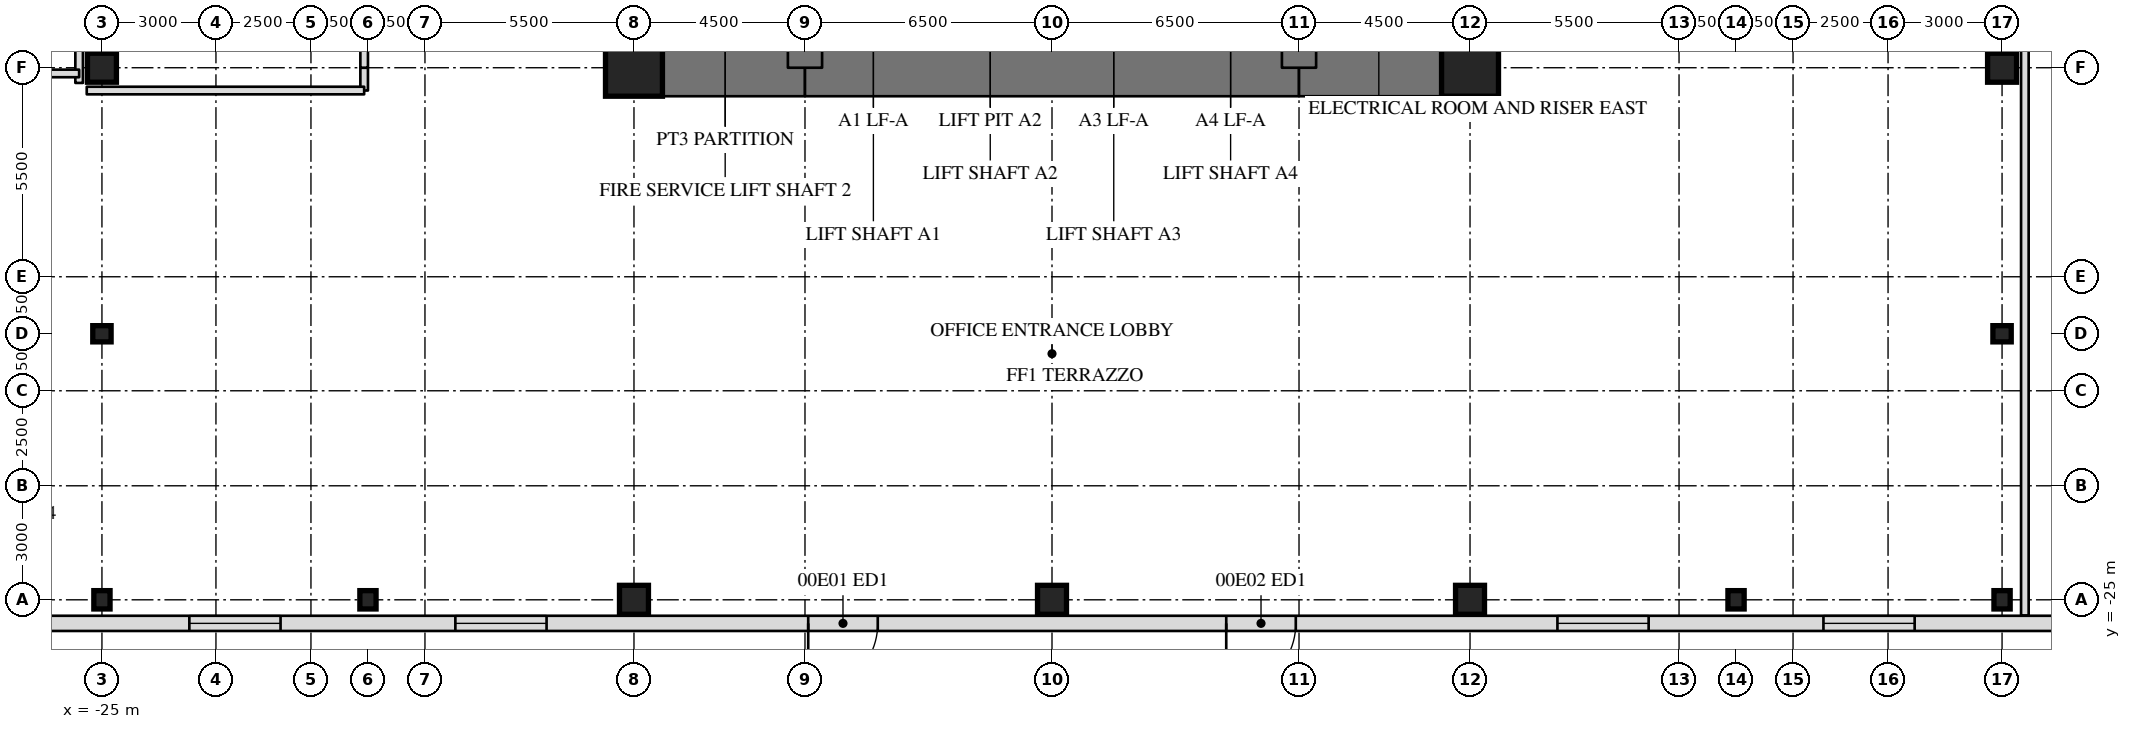
"""IFC4 building model, lengths in metres.
Left out: names, types, materials, properties, quantities, classifications, styles, units other than length and angle.
Written with IfcOpenShell. Run it as: python <this file> out.ifc"""

import sys

from ifc_helpers import new_model, si_unit, direction, frame, frame_2d, origin, origin_2d, place, context, subcontext, project, spatial, rectangle, hollow_rectangle, i_section, extrude, element, fill, save


model = new_model("IFC4")
c1 = context("Model", 3, precision=1e-05, world=origin(), true_north=direction((0.0, 1.0)))
c2 = subcontext(c1, "Body", "Model", "MODEL_VIEW")
j1 = project(units=[si_unit("LENGTHUNIT", "METRE"), si_unit("PLANEANGLEUNIT", "RADIAN")], contexts=[c1])
p1 = place(None, origin())
s1 = spatial("IfcSite", under=j1, at=p1, CompositionType="ELEMENT")
p2 = place(p1, origin())
s2 = spatial("IfcBuilding", under=s1, at=p2, CompositionType="ELEMENT")
p3 = place(p2, origin())
s3 = spatial("IfcBuildingStorey", under=s2, at=p3, CompositionType="ELEMENT", Elevation=0.0)
p4 = place(p3, frame((-25.0, -11.0, -0.3), z_axis=(0.0, 0.0, 1.0), x_axis=(0.0, 1.0, 0.0)))
e1 = element("IfcColumn", 1, at=p4, inside=s3, PredefinedType="COLUMN", context=c2, shape_type="SweptSolid", body=[
    extrude(hollow_rectangle(XDim=0.762, YDim=0.762, WallThickness=0.152, at=origin_2d()), origin(), (0.0, 0.0, 1.0), 6.3),
])
for number, where, z_axis, x_axis in (
    (2, (-25.0, -18.0, -0.3), (0.0, 0.0, 1.0), (0.0, 1.0, 0.0)),
    (3, (-25.0, -25.0, -0.3), (0.0, 0.0, 1.0), (1.0, 0.0, 0.0)),
    (4, (-18.0, -25.0, -0.3), (0.0, 0.0, 1.0), (1.0, 0.0, 0.0)),
):
    element("IfcColumn", number, at=place(p3, frame(where, z_axis=z_axis, x_axis=x_axis)), inside=s3, PredefinedType="COLUMN", context=c2, shape_type="SweptSolid", body=[
        extrude(i_section(OverallWidth=0.427, OverallDepth=0.483, WebThickness=0.051, FlangeThickness=0.082, at=origin_2d()), origin(), (0.0, 0.0, 1.0), 6.3),
    ])
for number, where, z_axis, x_axis in (
    (5, (-11.0, -25.0, -0.3), (0.0, 0.0, 1.0), (1.0, 0.0, 0.0)),
    (6, (0.0, -25.0, -0.3), (0.0, 0.0, 1.0), (1.0, 0.0, 0.0)),
    (7, (11.0, -25.0, -0.3), (0.0, 0.0, 1.0), (1.0, 0.0, 0.0)),
):
    element("IfcColumn", number, at=place(p3, frame(where, z_axis=z_axis, x_axis=x_axis)), inside=s3, PredefinedType="COLUMN", context=c2, shape_type="SweptSolid", body=[
        extrude(hollow_rectangle(XDim=0.762, YDim=0.762, WallThickness=0.152, at=origin_2d()), origin(), (0.0, 0.0, 1.0), 6.3),
    ])
for number, where, z_axis, x_axis in (
    (8, (18.0, -25.0, -0.3), (0.0, 0.0, 1.0), (1.0, 0.0, 0.0)),
    (9, (25.0, -25.0, -0.3), (0.0, 0.0, 1.0), (1.0, 0.0, 0.0)),
    (10, (25.0, -18.0, -0.3), (0.0, 0.0, 1.0), (0.0, 1.0, 0.0)),
):
    element("IfcColumn", number, at=place(p3, frame(where, z_axis=z_axis, x_axis=x_axis)), inside=s3, PredefinedType="COLUMN", context=c2, shape_type="SweptSolid", body=[
        extrude(i_section(OverallWidth=0.427, OverallDepth=0.483, WebThickness=0.051, FlangeThickness=0.082, at=origin_2d()), origin(), (0.0, 0.0, 1.0), 6.3),
    ])
p5 = place(p3, frame((25.0, -11.0, -0.3), z_axis=(0.0, 0.0, 1.0), x_axis=(0.0, 1.0, 0.0)))
e11 = element("IfcColumn", 11, at=p5, inside=s3, PredefinedType="COLUMN", context=c2, shape_type="SweptSolid", body=[
    extrude(hollow_rectangle(XDim=0.762, YDim=0.762, WallThickness=0.152, at=origin_2d()), origin(), (0.0, 0.0, 1.0), 6.3),
])
p6 = place(p3, frame((11.0, -11.0, -0.3), z_axis=(0.0, 0.0, 1.0), x_axis=(0.0, 1.0, 0.0)))
e12 = element("IfcWall", 12, at=p6, inside=s3, PredefinedType="SHEAR", context=c2, shape_type="SweptSolid", body=[
    extrude(rectangle(XDim=22.0, YDim=1.5, at=frame_2d((11.0, 0.0))), origin(), (0.0, 0.0, 1.0), 6.3),
])
p7 = place(p6, frame((15.393, 0.0, 0.3)))
e13 = element("IfcOpeningElement", 13, at=p7, cuts=e12, PredefinedType="OPENING", context=c2, shape_type="SweptSolid", body=[
    extrude(rectangle(XDim=0.915, YDim=2.134, at=frame_2d((0.458, 1.067))), frame((0.0, 0.76, 0.0), z_axis=(0.0, -1.0, 0.0), x_axis=(1.0, 0.0, 0.0)), (0.0, 0.0, 1.0), 1.52),
])
p8 = place(p3, frame((-11.0, 11.0, -0.3), z_axis=(0.0, 0.0, 1.0), x_axis=(0.0, -1.0, 0.0)))
e14 = element("IfcWall", 14, at=p8, inside=s3, PredefinedType="SHEAR", context=c2, shape_type="SweptSolid", body=[
    extrude(rectangle(XDim=22.0, YDim=1.5, at=frame_2d((11.0, 0.0))), origin(), (0.0, 0.0, 1.0), 6.3),
])
p9 = place(p8, frame((15.393, 0.0, 0.3)))
e15 = element("IfcOpeningElement", 15, at=p9, cuts=e14, PredefinedType="OPENING", context=c2, shape_type="SweptSolid", body=[
    extrude(rectangle(XDim=0.915, YDim=2.134, at=frame_2d((0.458, 1.067))), frame((0.0, 0.76, 0.0), z_axis=(0.0, -1.0, 0.0), x_axis=(1.0, 0.0, 0.0)), (0.0, 0.0, 1.0), 1.52),
])
p10 = place(p3, frame((-11.0, -11.0, -0.3), z_axis=(0.0, 0.0, 1.0), x_axis=(1.0, 0.0, 0.0)))
e16 = element("IfcWall", 16, at=p10, inside=s3, PredefinedType="SHEAR", context=c2, shape_type="SweptSolid", body=[
    extrude(rectangle(XDim=4.5, YDim=1.5, at=frame_2d((2.25, 0.0))), origin(), (0.0, 0.0, 1.0), 6.3),
])
p11 = place(p3, frame((-6.5, -11.0, -0.3), z_axis=(0.0, 0.0, 1.0), x_axis=(1.0, 0.0, 0.0)))
e17 = element("IfcWall", 17, at=p11, inside=s3, PredefinedType="SHEAR", context=c2, shape_type="SweptSolid", body=[
    extrude(rectangle(XDim=13.0, YDim=1.5, at=frame_2d((6.5, 0.0))), origin(), (0.0, 0.0, 1.0), 6.3),
])
p12 = place(p3, frame((6.5, -11.0, -0.3), z_axis=(0.0, 0.0, 1.0), x_axis=(1.0, 0.0, 0.0)))
e18 = element("IfcWall", 18, at=p12, inside=s3, PredefinedType="SHEAR", context=c2, shape_type="SweptSolid", body=[
    extrude(rectangle(XDim=4.5, YDim=1.5, at=frame_2d((2.25, 0.0))), origin(), (0.0, 0.0, 1.0), 6.3),
])
for number, where, z_axis, x_axis in (
    (19, (6.5, -11.0, -0.3), (0.0, 0.0, 1.0), (0.0, 1.0, 0.0)),
    (20, (-6.5, -6.5, -0.3), (0.0, 0.0, 1.0), (0.0, -1.0, 0.0)),
):
    element("IfcWall", number, at=place(p3, frame(where, z_axis=z_axis, x_axis=x_axis)), inside=s3, PredefinedType="SHEAR", context=c2, shape_type="SweptSolid", body=[
        extrude(rectangle(XDim=4.5, YDim=0.9, at=frame_2d((2.25, 0.0))), origin(), (0.0, 0.0, 1.0), 6.3),
    ])
for number, where, z_axis, x_axis in (
    (21, (-11.0, -11.0, -0.3), (0.0, 0.0, 1.0), (1.0, 0.0, 0.0)),
    (22, (11.0, -11.0, -0.3), (0.0, 0.0, 1.0), (1.0, 0.0, 0.0)),
):
    element("IfcColumn", number, at=place(p3, frame(where, z_axis=z_axis, x_axis=x_axis)), inside=s3, PredefinedType="COLUMN", context=c2, shape_type="SweptSolid", body=[
        extrude(hollow_rectangle(XDim=1.499, YDim=1.499, WallThickness=0.102, at=origin_2d()), origin(), (0.0, 0.0, 1.0), 6.3),
    ])
p13 = place(p3, frame((-39.82, -25.62, -0.3), z_axis=(0.0, 0.0, 1.0), x_axis=(1.0, 0.0, 0.0)))
e23 = element("IfcWall", 23, at=p13, inside=s3, PredefinedType="SOLIDWALL", context=c2, shape_type="SweptSolid", body=[
    extrude(rectangle(XDim=79.64, YDim=0.4, at=frame_2d((39.82, 0.0))), origin(), (0.0, 0.0, 1.0), 6.11),
])
p14 = place(p13, frame((3.12, 0.0, 1.2)))
e24 = element("IfcOpeningElement", 24, at=p14, cuts=e23, PredefinedType="OPENING", context=c2, shape_type="SweptSolid", body=[
    extrude(rectangle(XDim=2.4, YDim=4.2, at=frame_2d((1.2, 2.1))), frame((0.0, 0.21, 0.0), z_axis=(0.0, -1.0, 0.0), x_axis=(1.0, 0.0, 0.0)), (0.0, 0.0, 1.0), 0.42),
])
p15 = place(p13, frame((17.12, 0.0, 1.2)))
e25 = element("IfcOpeningElement", 25, at=p15, cuts=e23, PredefinedType="OPENING", context=c2, shape_type="SweptSolid", body=[
    extrude(rectangle(XDim=2.4, YDim=4.2, at=frame_2d((1.2, 2.1))), frame((0.0, 0.21, 0.0), z_axis=(0.0, -1.0, 0.0), x_axis=(1.0, 0.0, 0.0)), (0.0, 0.0, 1.0), 0.42),
])
p16 = place(p13, frame((24.12, 0.0, 1.2)))
e26 = element("IfcOpeningElement", 26, at=p16, cuts=e23, PredefinedType="OPENING", context=c2, shape_type="SweptSolid", body=[
    extrude(rectangle(XDim=2.4, YDim=4.2, at=frame_2d((1.2, 2.1))), frame((0.0, 0.21, 0.0), z_axis=(0.0, -1.0, 0.0), x_axis=(1.0, 0.0, 0.0)), (0.0, 0.0, 1.0), 0.42),
])
p17 = place(p13, frame((33.405, 0.0, 0.3)))
e27 = element("IfcOpeningElement", 27, at=p17, cuts=e23, PredefinedType="OPENING", context=c2, shape_type="SweptSolid", body=[
    extrude(rectangle(XDim=1.83, YDim=2.44, at=frame_2d((0.915, 1.22))), frame((0.0, 0.21, 0.0), z_axis=(0.0, -1.0, 0.0), x_axis=(1.0, 0.0, 0.0)), (0.0, 0.0, 1.0), 0.42),
])
p18 = place(p13, frame((44.405, 0.0, 0.3)))
e28 = element("IfcOpeningElement", 28, at=p18, cuts=e23, PredefinedType="OPENING", context=c2, shape_type="SweptSolid", body=[
    extrude(rectangle(XDim=1.83, YDim=2.44, at=frame_2d((0.915, 1.22))), frame((0.0, 0.21, 0.0), z_axis=(0.0, -1.0, 0.0), x_axis=(1.0, 0.0, 0.0)), (0.0, 0.0, 1.0), 0.42),
])
p19 = place(p13, frame((53.12, 0.0, 1.2)))
e29 = element("IfcOpeningElement", 29, at=p19, cuts=e23, PredefinedType="OPENING", context=c2, shape_type="SweptSolid", body=[
    extrude(rectangle(XDim=2.4, YDim=4.2, at=frame_2d((1.2, 2.1))), frame((0.0, 0.21, 0.0), z_axis=(0.0, -1.0, 0.0), x_axis=(1.0, 0.0, 0.0)), (0.0, 0.0, 1.0), 0.42),
])
p20 = place(p13, frame((60.12, 0.0, 1.2)))
e30 = element("IfcOpeningElement", 30, at=p20, cuts=e23, PredefinedType="OPENING", context=c2, shape_type="SweptSolid", body=[
    extrude(rectangle(XDim=2.4, YDim=4.2, at=frame_2d((1.2, 2.1))), frame((0.0, 0.21, 0.0), z_axis=(0.0, -1.0, 0.0), x_axis=(1.0, 0.0, 0.0)), (0.0, 0.0, 1.0), 0.42),
])
p21 = place(p13, frame((67.785, 0.0, 0.3)))
e31 = element("IfcOpeningElement", 31, at=p21, cuts=e23, PredefinedType="OPENING", context=c2, shape_type="SweptSolid", body=[
    extrude(rectangle(XDim=1.07, YDim=2.44, at=frame_2d((0.535, 1.22))), frame((0.0, 0.21, 0.0), z_axis=(0.0, -1.0, 0.0), x_axis=(1.0, 0.0, 0.0)), (0.0, 0.0, 1.0), 0.42),
])
p22 = place(p13, frame((74.12, 0.0, 1.2)))
e32 = element("IfcOpeningElement", 32, at=p22, cuts=e23, PredefinedType="OPENING", context=c2, shape_type="SweptSolid", body=[
    extrude(rectangle(XDim=2.4, YDim=4.2, at=frame_2d((1.2, 2.1))), frame((0.0, 0.21, 0.0), z_axis=(0.0, -1.0, 0.0), x_axis=(1.0, 0.0, 0.0)), (0.0, 0.0, 1.0), 0.42),
])
p23 = place(p13, frame((10.785, 0.0, 0.3)))
e33 = element("IfcOpeningElement", 33, at=p23, cuts=e23, PredefinedType="OPENING", context=c2, shape_type="SweptSolid", body=[
    extrude(rectangle(XDim=1.07, YDim=2.13, at=frame_2d((0.535, 1.065))), frame((0.0, 0.21, 0.0), z_axis=(0.0, -1.0, 0.0), x_axis=(1.0, 0.0, 0.0)), (0.0, 0.0, 1.0), 0.42),
])
p24 = place(p3, frame((25.6, -25.41, 0.0), z_axis=(0.0, 0.0, 1.0), x_axis=(0.0, 1.0, 0.0)))
e34 = element("IfcWall", 34, at=p24, inside=s3, PredefinedType="PARTITIONING", context=c2, shape_type="SweptSolid", body=[
    extrude(rectangle(XDim=36.81, YDim=0.2, at=frame_2d((18.405, 0.0))), origin(), (0.0, 0.0, 1.0), 5.81),
])
p25 = place(p24, frame((29.995, 0.0, 0.3)))
e35 = element("IfcOpeningElement", 35, at=p25, cuts=e34, PredefinedType="OPENING", context=c2, shape_type="SweptSolid", body=[
    extrude(rectangle(XDim=1.83, YDim=2.134, at=frame_2d((0.915, 1.067))), frame((0.0, 0.11, 0.0), z_axis=(0.0, -1.0, 0.0), x_axis=(1.0, 0.0, 0.0)), (0.0, 0.0, 1.0), 0.22),
])
p26 = place(p24, frame((18.995, 0.0, 0.3)))
e36 = element("IfcOpeningElement", 36, at=p26, cuts=e34, PredefinedType="OPENING", context=c2, shape_type="SweptSolid", body=[
    extrude(rectangle(XDim=1.83, YDim=2.134, at=frame_2d((0.915, 1.067))), frame((0.0, 0.11, 0.0), z_axis=(0.0, -1.0, 0.0), x_axis=(1.0, 0.0, 0.0)), (0.0, 0.0, 1.0), 0.22),
])
p27 = place(p3, frame((-25.6, 25.41, 0.0), z_axis=(0.0, 0.0, 1.0), x_axis=(0.0, -1.0, 0.0)))
e37 = element("IfcWall", 37, at=p27, inside=s3, PredefinedType="PARTITIONING", context=c2, shape_type="SweptSolid", body=[
    extrude(rectangle(XDim=36.81, YDim=0.2, at=frame_2d((18.405, 0.0))), origin(), (0.0, 0.0, 1.0), 5.81),
])
p28 = place(p27, frame((29.995, 0.0, 0.3)))
e38 = element("IfcOpeningElement", 38, at=p28, cuts=e37, PredefinedType="OPENING", context=c2, shape_type="SweptSolid", body=[
    extrude(rectangle(XDim=1.83, YDim=2.134, at=frame_2d((0.915, 1.067))), frame((0.0, 0.11, 0.0), z_axis=(0.0, -1.0, 0.0), x_axis=(1.0, 0.0, 0.0)), (0.0, 0.0, 1.0), 0.22),
])
p29 = place(p27, frame((18.995, 0.0, 0.3)))
e39 = element("IfcOpeningElement", 39, at=p29, cuts=e37, PredefinedType="OPENING", context=c2, shape_type="SweptSolid", body=[
    extrude(rectangle(XDim=1.83, YDim=2.134, at=frame_2d((0.915, 1.067))), frame((0.0, 0.11, 0.0), z_axis=(0.0, -1.0, 0.0), x_axis=(1.0, 0.0, 0.0)), (0.0, 0.0, 1.0), 0.22),
])
p30 = place(p3, frame((-18.1, -11.6, 0.0), z_axis=(0.0, 0.0, 1.0), x_axis=(0.0, 1.0, 0.0)))
e40 = element("IfcWall", 40, at=p30, inside=s3, PredefinedType="PARTITIONING", context=c2, shape_type="SweptSolid", body=[
    extrude(rectangle(XDim=0.6, YDim=0.2, at=frame_2d((0.3, 0.0))), origin(), (0.0, 0.0, 1.0), 5.183),
])
p31 = place(p3, frame((-18.1, -11.0, 0.0), z_axis=(0.0, 0.0, 1.0), x_axis=(0.0, 1.0, 0.0)))
e41 = element("IfcWall", 41, at=p31, inside=s3, PredefinedType="PARTITIONING", context=c2, shape_type="SweptSolid", body=[
    extrude(rectangle(XDim=4.7, YDim=0.2, at=frame_2d((2.35, 0.0))), origin(), (0.0, 0.0, 1.0), 5.81),
])
p32 = place(p31, frame((0.942, 0.0, 0.3)))
e42 = element("IfcOpeningElement", 42, at=p32, cuts=e41, PredefinedType="OPENING", context=c2, shape_type="SweptSolid", body=[
    extrude(rectangle(XDim=0.915, YDim=2.134, at=frame_2d((0.458, 1.067))), frame((0.0, 0.11, 0.0), z_axis=(0.0, -1.0, 0.0), x_axis=(1.0, 0.0, 0.0)), (0.0, 0.0, 1.0), 0.22),
])
p33 = place(p3, frame((-25.4, -11.6, 0.0), z_axis=(0.0, 0.0, 1.0), x_axis=(1.0, 0.0, 0.0)))
e43 = element("IfcWall", 43, at=p33, inside=s3, PredefinedType="PARTITIONING", context=c2, shape_type="SweptSolid", body=[
    extrude(rectangle(XDim=7.3, YDim=0.2, at=frame_2d((3.65, 0.0))), origin(), (0.0, 0.0, 1.0), 5.81),
])
p34 = place(p3, frame((-25.6, -11.15, 0.0), z_axis=(0.0, 0.0, 1.0), x_axis=(-1.0, 0.0, 0.0)))
e44 = element("IfcWall", 44, at=p34, inside=s3, PredefinedType="PARTITIONING", context=c2, shape_type="SweptSolid", body=[
    extrude(rectangle(XDim=13.81, YDim=0.2, at=frame_2d((6.905, 0.0))), origin(), (0.0, 0.0, 1.0), 5.198),
])
p35 = place(p15, origin())
e45 = element("IfcWindow", 45, at=p35, inside=s3, PartitioningType="SINGLE_PANEL", PredefinedType="WINDOW", context=c2, shape_type="SweptSolid", body=[
    extrude(rectangle(XDim=2.4, YDim=4.2, at=frame_2d((1.2, 2.1))), frame((0.0, 0.03, 0.0), z_axis=(0.0, -1.0, 0.0), x_axis=(1.0, 0.0, 0.0)), (0.0, 0.0, 1.0), 0.06),
])
fill(e25, e45)
p36 = place(p16, origin())
e46 = element("IfcWindow", 46, at=p36, inside=s3, PartitioningType="SINGLE_PANEL", PredefinedType="WINDOW", context=c2, shape_type="SweptSolid", body=[
    extrude(rectangle(XDim=2.4, YDim=4.2, at=frame_2d((1.2, 2.1))), frame((0.0, 0.03, 0.0), z_axis=(0.0, -1.0, 0.0), x_axis=(1.0, 0.0, 0.0)), (0.0, 0.0, 1.0), 0.06),
])
fill(e26, e46)
p37 = place(p17, frame((1.83, 0.0, 0.0), z_axis=(0.0, 0.0, 1.0), x_axis=(-1.0, 0.0, 0.0)))
e47 = element("IfcDoor", 47, at=p37, inside=s3, OperationType="SINGLE_SWING_LEFT", PredefinedType="DOOR", context=c2, shape_type="SweptSolid", body=[
    extrude(rectangle(XDim=1.83, YDim=2.44, at=frame_2d((0.915, 1.22))), frame((0.0, 0.025, 0.0), z_axis=(0.0, -1.0, 0.0), x_axis=(1.0, 0.0, 0.0)), (0.0, 0.0, 1.0), 0.05),
])
fill(e27, e47)
p38 = place(p18, frame((1.83, 0.0, 0.0), z_axis=(0.0, 0.0, 1.0), x_axis=(-1.0, 0.0, 0.0)))
e48 = element("IfcDoor", 48, at=p38, inside=s3, OperationType="SINGLE_SWING_LEFT", PredefinedType="DOOR", context=c2, shape_type="SweptSolid", body=[
    extrude(rectangle(XDim=1.83, YDim=2.44, at=frame_2d((0.915, 1.22))), frame((0.0, 0.025, 0.0), z_axis=(0.0, -1.0, 0.0), x_axis=(1.0, 0.0, 0.0)), (0.0, 0.0, 1.0), 0.05),
])
fill(e28, e48)
p39 = place(p19, origin())
e49 = element("IfcWindow", 49, at=p39, inside=s3, PartitioningType="SINGLE_PANEL", PredefinedType="WINDOW", context=c2, shape_type="SweptSolid", body=[
    extrude(rectangle(XDim=2.4, YDim=4.2, at=frame_2d((1.2, 2.1))), frame((0.0, 0.03, 0.0), z_axis=(0.0, -1.0, 0.0), x_axis=(1.0, 0.0, 0.0)), (0.0, 0.0, 1.0), 0.06),
])
fill(e29, e49)
p40 = place(p20, origin())
e50 = element("IfcWindow", 50, at=p40, inside=s3, PartitioningType="SINGLE_PANEL", PredefinedType="WINDOW", context=c2, shape_type="SweptSolid", body=[
    extrude(rectangle(XDim=2.4, YDim=4.2, at=frame_2d((1.2, 2.1))), frame((0.0, 0.03, 0.0), z_axis=(0.0, -1.0, 0.0), x_axis=(1.0, 0.0, 0.0)), (0.0, 0.0, 1.0), 0.06),
])
fill(e30, e50)
save(model, sys.argv[1])
